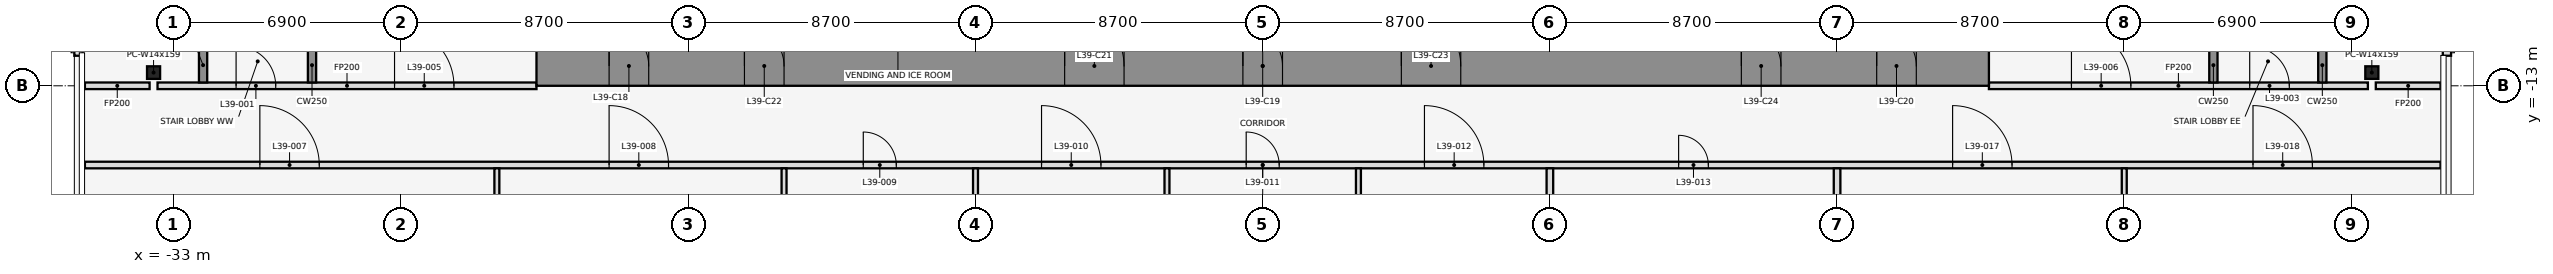
"""IFC4 building model, lengths in metres.
Left out: names, types, materials, properties, quantities, classifications, styles, units other than length and angle.
Written with IfcOpenShell. Run it as: python <this file> out.ifc"""

import sys

from ifc_helpers import new_model, si_unit, direction, frame, frame_2d, origin, origin_2d, place, context, subcontext, project, spatial, rectangle, i_section, extrude, element, fill, save


model = new_model("IFC4")
c1 = context("Model", 3, precision=1e-05, world=origin(), true_north=direction((0.0, 1.0)))
c2 = subcontext(c1, "Body", "Model", "MODEL_VIEW")
j1 = project(units=[si_unit("LENGTHUNIT", "METRE"), si_unit("PLANEANGLEUNIT", "RADIAN")], contexts=[c1])
p1 = place(None, origin())
s1 = spatial("IfcSite", under=j1, at=p1, CompositionType="ELEMENT")
p2 = place(p1, origin())
s2 = spatial("IfcBuilding", under=s1, at=p2, CompositionType="ELEMENT")
p3 = place(p2, frame((0.0, 0.0, 177.3)))
s3 = spatial("IfcBuildingStorey", under=s2, at=p3, CompositionType="ELEMENT", Elevation=177.3)
for number, where, z_axis, x_axis in (
    (1, (-33.6, -12.6, 0.0), (0.0, 0.0, 1.0), (1.0, 0.0, 0.0)),
    (2, (33.6, -12.6, 0.0), (0.0, 0.0, 1.0), (1.0, 0.0, 0.0)),
):
    element("IfcColumn", number, at=place(p3, frame(where, z_axis=z_axis, x_axis=x_axis)), inside=s3, PredefinedType="COLUMN", context=c2, shape_type="SweptSolid", body=[
        extrude(i_section(OverallWidth=0.396, OverallDepth=0.381, WebThickness=0.019, FlangeThickness=0.03, at=origin_2d()), origin(), (0.0, 0.0, 1.0), 4.1),
    ])
for number, where, z_axis, x_axis in (
    (3, (-35.875, -3.0, 0.0), (0.0, 0.0, 1.0), (0.0, -1.0, 0.0)),
    (4, (35.875, -12.09, 0.0), (0.0, 0.0, 1.0), (0.0, 1.0, 0.0)),
):
    element("IfcWall", number, at=place(p3, frame(where, z_axis=z_axis, x_axis=x_axis)), inside=s3, PredefinedType="STANDARD", context=c2, shape_type="SweptSolid", body=[
        extrude(rectangle(XDim=9.09, YDim=0.25, at=frame_2d((4.545, 0.0))), origin(), (0.0, 0.0, 1.0), 3.95),
    ])
p4 = place(p3, frame((-35.68, -15.4, 0.0), z_axis=(0.0, 0.0, 1.0), x_axis=(1.0, 0.0, 0.0)))
e5 = element("IfcWall", 5, at=p4, inside=s3, PredefinedType="PARTITIONING", context=c2, shape_type="SweptSolid", body=[
    extrude(rectangle(XDim=71.36, YDim=0.2, at=frame_2d((35.68, 0.0))), origin(), (0.0, 0.0, 1.0), 2.84),
])
p5 = place(p4, frame((5.3, 0.0, 0.0)))
e6 = element("IfcOpeningElement", 6, at=p5, cuts=e5, PredefinedType="OPENING", context=c2, shape_type="SweptSolid", body=[
    extrude(rectangle(XDim=1.8, YDim=2.1, at=frame_2d((0.9, 1.05))), frame((0.0, 0.112, 0.0), z_axis=(0.0, -1.0, 0.0), x_axis=(1.0, 0.0, 0.0)), (0.0, 0.0, 1.0), 0.224),
])
p6 = place(p4, frame((15.88, 0.0, 0.0)))
e7 = element("IfcOpeningElement", 7, at=p6, cuts=e5, PredefinedType="OPENING", context=c2, shape_type="SweptSolid", body=[
    extrude(rectangle(XDim=1.8, YDim=2.1, at=frame_2d((0.9, 1.05))), frame((0.0, 0.112, 0.0), z_axis=(0.0, -1.0, 0.0), x_axis=(1.0, 0.0, 0.0)), (0.0, 0.0, 1.0), 0.224),
])
p7 = place(p4, frame((23.58, 0.0, 0.0)))
e8 = element("IfcOpeningElement", 8, at=p7, cuts=e5, PredefinedType="OPENING", context=c2, shape_type="SweptSolid", body=[
    extrude(rectangle(XDim=1.0, YDim=2.1, at=frame_2d((0.5, 1.05))), frame((0.0, 0.112, 0.0), z_axis=(0.0, -1.0, 0.0), x_axis=(1.0, 0.0, 0.0)), (0.0, 0.0, 1.0), 0.224),
])
p8 = place(p4, frame((28.98, 0.0, 0.0)))
e9 = element("IfcOpeningElement", 9, at=p8, cuts=e5, PredefinedType="OPENING", context=c2, shape_type="SweptSolid", body=[
    extrude(rectangle(XDim=1.8, YDim=2.1, at=frame_2d((0.9, 1.05))), frame((0.0, 0.112, 0.0), z_axis=(0.0, -1.0, 0.0), x_axis=(1.0, 0.0, 0.0)), (0.0, 0.0, 1.0), 0.224),
])
p9 = place(p4, frame((35.18, 0.0, 0.0)))
e10 = element("IfcOpeningElement", 10, at=p9, cuts=e5, PredefinedType="OPENING", context=c2, shape_type="SweptSolid", body=[
    extrude(rectangle(XDim=1.0, YDim=2.1, at=frame_2d((0.5, 1.05))), frame((0.0, 0.112, 0.0), z_axis=(0.0, -1.0, 0.0), x_axis=(1.0, 0.0, 0.0)), (0.0, 0.0, 1.0), 0.224),
])
p10 = place(p4, frame((40.58, 0.0, 0.0)))
e11 = element("IfcOpeningElement", 11, at=p10, cuts=e5, PredefinedType="OPENING", context=c2, shape_type="SweptSolid", body=[
    extrude(rectangle(XDim=1.8, YDim=2.1, at=frame_2d((0.9, 1.05))), frame((0.0, 0.112, 0.0), z_axis=(0.0, -1.0, 0.0), x_axis=(1.0, 0.0, 0.0)), (0.0, 0.0, 1.0), 0.224),
])
p11 = place(p4, frame((48.28, 0.0, 0.0)))
e12 = element("IfcOpeningElement", 12, at=p11, cuts=e5, PredefinedType="OPENING", context=c2, shape_type="SweptSolid", body=[
    extrude(rectangle(XDim=0.9, YDim=2.1, at=frame_2d((0.45, 1.05))), frame((0.0, 0.112, 0.0), z_axis=(0.0, -1.0, 0.0), x_axis=(1.0, 0.0, 0.0)), (0.0, 0.0, 1.0), 0.224),
])
p12 = place(p4, frame((56.58, 0.0, 0.0)))
e13 = element("IfcOpeningElement", 13, at=p12, cuts=e5, PredefinedType="OPENING", context=c2, shape_type="SweptSolid", body=[
    extrude(rectangle(XDim=1.8, YDim=2.1, at=frame_2d((0.9, 1.05))), frame((0.0, 0.112, 0.0), z_axis=(0.0, -1.0, 0.0), x_axis=(1.0, 0.0, 0.0)), (0.0, 0.0, 1.0), 0.224),
])
p13 = place(p4, frame((65.68, 0.0, 0.0)))
e14 = element("IfcOpeningElement", 14, at=p13, cuts=e5, PredefinedType="OPENING", context=c2, shape_type="SweptSolid", body=[
    extrude(rectangle(XDim=1.8, YDim=2.1, at=frame_2d((0.9, 1.05))), frame((0.0, 0.112, 0.0), z_axis=(0.0, -1.0, 0.0), x_axis=(1.0, 0.0, 0.0)), (0.0, 0.0, 1.0), 0.224),
])
p14 = place(p3, frame((-35.68, -13.0, 0.0), z_axis=(0.0, 0.0, 1.0), x_axis=(1.0, 0.0, 0.0)))
e15 = element("IfcWall", 15, at=p14, inside=s3, PredefinedType="PARTITIONING", context=c2, shape_type="SweptSolid", body=[
    extrude(rectangle(XDim=1.96, YDim=0.2, at=frame_2d((0.98, 0.0))), origin(), (0.0, 0.0, 1.0), 2.84),
])
p15 = place(p3, frame((-33.48, -13.0, 0.0), z_axis=(0.0, 0.0, 1.0), x_axis=(1.0, 0.0, 0.0)))
e16 = element("IfcWall", 16, at=p15, inside=s3, PredefinedType="PARTITIONING", context=c2, shape_type="SweptSolid", body=[
    extrude(rectangle(XDim=11.48, YDim=0.2, at=frame_2d((5.74, 0.0))), origin(), (0.0, 0.0, 1.0), 2.84),
])
p16 = place(p15, frame((2.38, 0.0, 0.0)))
e17 = element("IfcOpeningElement", 17, at=p16, cuts=e16, PredefinedType="OPENING", context=c2, shape_type="SweptSolid", body=[
    extrude(rectangle(XDim=1.2, YDim=2.1, at=frame_2d((0.6, 1.05))), frame((0.0, 0.112, 0.0), z_axis=(0.0, -1.0, 0.0), x_axis=(1.0, 0.0, 0.0)), (0.0, 0.0, 1.0), 0.224),
])
p17 = place(p15, frame((7.18, 0.0, 0.0)))
e18 = element("IfcOpeningElement", 18, at=p17, cuts=e16, PredefinedType="OPENING", context=c2, shape_type="SweptSolid", body=[
    extrude(rectangle(XDim=1.8, YDim=2.1, at=frame_2d((0.9, 1.05))), frame((0.0, 0.112, 0.0), z_axis=(0.0, -1.0, 0.0), x_axis=(1.0, 0.0, 0.0)), (0.0, 0.0, 1.0), 0.224),
])
p18 = place(p3, frame((22.0, -13.0, 0.0), z_axis=(0.0, 0.0, 1.0), x_axis=(1.0, 0.0, 0.0)))
e19 = element("IfcWall", 19, at=p18, inside=s3, PredefinedType="PARTITIONING", context=c2, shape_type="SweptSolid", body=[
    extrude(rectangle(XDim=11.48, YDim=0.2, at=frame_2d((5.74, 0.0))), origin(), (0.0, 0.0, 1.0), 2.84),
])
p19 = place(p18, frame((7.9, 0.0, 0.0)))
e20 = element("IfcOpeningElement", 20, at=p19, cuts=e19, PredefinedType="OPENING", context=c2, shape_type="SweptSolid", body=[
    extrude(rectangle(XDim=1.2, YDim=2.1, at=frame_2d((0.6, 1.05))), frame((0.0, 0.112, 0.0), z_axis=(0.0, -1.0, 0.0), x_axis=(1.0, 0.0, 0.0)), (0.0, 0.0, 1.0), 0.224),
])
p20 = place(p18, frame((2.5, 0.0, 0.0)))
e21 = element("IfcOpeningElement", 21, at=p20, cuts=e19, PredefinedType="OPENING", context=c2, shape_type="SweptSolid", body=[
    extrude(rectangle(XDim=1.8, YDim=2.1, at=frame_2d((0.9, 1.05))), frame((0.0, 0.112, 0.0), z_axis=(0.0, -1.0, 0.0), x_axis=(1.0, 0.0, 0.0)), (0.0, 0.0, 1.0), 0.224),
])
p21 = place(p3, frame((33.72, -13.0, 0.0), z_axis=(0.0, 0.0, 1.0), x_axis=(1.0, 0.0, 0.0)))
e22 = element("IfcWall", 22, at=p21, inside=s3, PredefinedType="PARTITIONING", context=c2, shape_type="SweptSolid", body=[
    extrude(rectangle(XDim=1.96, YDim=0.2, at=frame_2d((0.98, 0.0))), origin(), (0.0, 0.0, 1.0), 2.84),
])
for number, where, z_axis, x_axis in (
    (23, (-32.1, -12.9, 0.0), (0.0, 0.0, 1.0), (0.0, 1.0, 0.0)),
    (24, (-28.8, -12.9, 0.0), (0.0, 0.0, 1.0), (0.0, 1.0, 0.0)),
):
    element("IfcWall", number, at=place(p3, frame(where, z_axis=z_axis, x_axis=x_axis)), inside=s3, PredefinedType="SHEAR", context=c2, shape_type="SweptSolid", body=[
        extrude(rectangle(XDim=1.05, YDim=0.25, at=frame_2d((0.525, 0.0))), origin(), (0.0, 0.0, 1.0), 4.1),
    ])
p22 = place(p3, frame((-23.2, -33.74, 0.0), z_axis=(0.0, 0.0, 1.0), x_axis=(0.0, 1.0, 0.0)))
e25 = element("IfcWall", 25, at=p22, inside=s3, PredefinedType="PARTITIONING", context=c2, shape_type="SweptSolid", body=[
    extrude(rectangle(XDim=18.24, YDim=0.15, at=frame_2d((9.12, 0.0))), origin(), (0.0, 0.0, 1.0), 2.84),
])
p23 = place(p3, frame((-14.5, -32.145, 0.0), z_axis=(0.0, 0.0, 1.0), x_axis=(0.0, 1.0, 0.0)))
e26 = element("IfcWall", 26, at=p23, inside=s3, PredefinedType="PARTITIONING", context=c2, shape_type="SweptSolid", body=[
    extrude(rectangle(XDim=16.645, YDim=0.15, at=frame_2d((8.323, 0.0))), origin(), (0.0, 0.0, 1.0), 2.84),
])
p24 = place(p3, frame((-8.7, -34.295, 0.0), z_axis=(0.0, 0.0, 1.0), x_axis=(0.0, 1.0, 0.0)))
e27 = element("IfcWall", 27, at=p24, inside=s3, PredefinedType="PARTITIONING", context=c2, shape_type="SweptSolid", body=[
    extrude(rectangle(XDim=18.795, YDim=0.15, at=frame_2d((9.397, 0.0))), origin(), (0.0, 0.0, 1.0), 2.84),
])
for number, where, z_axis, x_axis in (
    (28, (-2.9, -35.42, 0.0), (0.0, 0.0, 1.0), (0.0, 1.0, 0.0)),
    (29, (2.9, -35.42, 0.0), (0.0, 0.0, 1.0), (0.0, 1.0, 0.0)),
):
    element("IfcWall", number, at=place(p3, frame(where, z_axis=z_axis, x_axis=x_axis)), inside=s3, PredefinedType="PARTITIONING", context=c2, shape_type="SweptSolid", body=[
        extrude(rectangle(XDim=19.92, YDim=0.15, at=frame_2d((9.96, 0.0))), origin(), (0.0, 0.0, 1.0), 2.84),
    ])
p25 = place(p3, frame((8.7, -34.295, 0.0), z_axis=(0.0, 0.0, 1.0), x_axis=(0.0, 1.0, 0.0)))
e30 = element("IfcWall", 30, at=p25, inside=s3, PredefinedType="PARTITIONING", context=c2, shape_type="SweptSolid", body=[
    extrude(rectangle(XDim=18.795, YDim=0.2, at=frame_2d((9.397, 0.0))), origin(), (0.0, 0.0, 1.0), 2.84),
])
p26 = place(p3, frame((17.4, -21.725, 0.0), z_axis=(0.0, 0.0, 1.0), x_axis=(0.0, 1.0, 0.0)))
e31 = element("IfcWall", 31, at=p26, inside=s3, PredefinedType="PARTITIONING", context=c2, shape_type="SweptSolid", body=[
    extrude(rectangle(XDim=6.225, YDim=0.2, at=frame_2d((3.113, 0.0))), origin(), (0.0, 0.0, 1.0), 2.84),
])
p27 = place(p3, frame((26.1, -33.74, 0.0), z_axis=(0.0, 0.0, 1.0), x_axis=(0.0, 1.0, 0.0)))
e32 = element("IfcWall", 32, at=p27, inside=s3, PredefinedType="PARTITIONING", context=c2, shape_type="SweptSolid", body=[
    extrude(rectangle(XDim=18.24, YDim=0.15, at=frame_2d((9.12, 0.0))), origin(), (0.0, 0.0, 1.0), 2.84),
])
for number, where, z_axis, x_axis in (
    (33, (28.8, -12.9, 0.0), (0.0, 0.0, 1.0), (0.0, 1.0, 0.0)),
    (34, (32.1, -12.9, 0.0), (0.0, 0.0, 1.0), (0.0, 1.0, 0.0)),
):
    element("IfcWall", number, at=place(p3, frame(where, z_axis=z_axis, x_axis=x_axis)), inside=s3, PredefinedType="SHEAR", context=c2, shape_type="SweptSolid", body=[
        extrude(rectangle(XDim=1.05, YDim=0.25, at=frame_2d((0.525, 0.0))), origin(), (0.0, 0.0, 1.0), 4.1),
    ])
p28 = place(p3, frame((-22.0, -12.4, 0.0), z_axis=(0.0, 0.0, 1.0), x_axis=(1.0, 0.0, 0.0)))
e35 = element("IfcWall", 35, at=p28, inside=s3, PredefinedType="SHEAR", context=c2, shape_type="SweptSolid", body=[
    extrude(rectangle(XDim=44.0, YDim=1.2, at=frame_2d((22.0, 0.0))), origin(), (0.0, 0.0, 1.0), 4.1),
])
p29 = place(p28, frame((2.2, 0.0, 0.0)))
e36 = element("IfcOpeningElement", 36, at=p29, cuts=e35, PredefinedType="OPENING", context=c2, shape_type="SweptSolid", body=[
    extrude(rectangle(XDim=1.2, YDim=2.1, at=frame_2d((0.6, 1.05))), frame((0.0, 0.612, 0.0), z_axis=(0.0, -1.0, 0.0), x_axis=(1.0, 0.0, 0.0)), (0.0, 0.0, 1.0), 1.224),
])
p30 = place(p28, frame((21.4, 0.0, 0.0)))
e37 = element("IfcOpeningElement", 37, at=p30, cuts=e35, PredefinedType="OPENING", context=c2, shape_type="SweptSolid", body=[
    extrude(rectangle(XDim=1.2, YDim=2.1, at=frame_2d((0.6, 1.05))), frame((0.0, 0.612, 0.0), z_axis=(0.0, -1.0, 0.0), x_axis=(1.0, 0.0, 0.0)), (0.0, 0.0, 1.0), 1.224),
])
p31 = place(p28, frame((40.6, 0.0, 0.0)))
e38 = element("IfcOpeningElement", 38, at=p31, cuts=e35, PredefinedType="OPENING", context=c2, shape_type="SweptSolid", body=[
    extrude(rectangle(XDim=1.2, YDim=2.1, at=frame_2d((0.6, 1.05))), frame((0.0, 0.612, 0.0), z_axis=(0.0, -1.0, 0.0), x_axis=(1.0, 0.0, 0.0)), (0.0, 0.0, 1.0), 1.224),
])
p32 = place(p28, frame((16.0, 0.0, 0.0)))
e39 = element("IfcOpeningElement", 39, at=p32, cuts=e35, PredefinedType="OPENING", context=c2, shape_type="SweptSolid", body=[
    extrude(rectangle(XDim=1.8, YDim=2.1, at=frame_2d((0.9, 1.05))), frame((0.0, 0.612, 0.0), z_axis=(0.0, -1.0, 0.0), x_axis=(1.0, 0.0, 0.0)), (0.0, 0.0, 1.0), 1.224),
])
p33 = place(p28, frame((6.3, 0.0, 0.0)))
e40 = element("IfcOpeningElement", 40, at=p33, cuts=e35, PredefinedType="OPENING", context=c2, shape_type="SweptSolid", body=[
    extrude(rectangle(XDim=1.2, YDim=2.1, at=frame_2d((0.6, 1.05))), frame((0.0, 0.612, 0.0), z_axis=(0.0, -1.0, 0.0), x_axis=(1.0, 0.0, 0.0)), (0.0, 0.0, 1.0), 1.224),
])
p34 = place(p28, frame((26.2, 0.0, 0.0)))
e41 = element("IfcOpeningElement", 41, at=p34, cuts=e35, PredefinedType="OPENING", context=c2, shape_type="SweptSolid", body=[
    extrude(rectangle(XDim=1.8, YDim=2.1, at=frame_2d((0.9, 1.05))), frame((0.0, 0.612, 0.0), z_axis=(0.0, -1.0, 0.0), x_axis=(1.0, 0.0, 0.0)), (0.0, 0.0, 1.0), 1.224),
])
p35 = place(p28, frame((36.5, 0.0, 0.0)))
e42 = element("IfcOpeningElement", 42, at=p35, cuts=e35, PredefinedType="OPENING", context=c2, shape_type="SweptSolid", body=[
    extrude(rectangle(XDim=1.2, YDim=2.1, at=frame_2d((0.6, 1.05))), frame((0.0, 0.612, 0.0), z_axis=(0.0, -1.0, 0.0), x_axis=(1.0, 0.0, 0.0)), (0.0, 0.0, 1.0), 1.224),
])
p36 = place(p16, origin())
e43 = element("IfcDoor", 43, at=p36, inside=s3, OperationType="SINGLE_SWING_LEFT", PredefinedType="DOOR", context=c2, shape_type="SweptSolid", body=[
    extrude(rectangle(XDim=1.2, YDim=2.1, at=frame_2d((0.6, 1.05))), frame((0.0, 0.025, 0.0), z_axis=(0.0, -1.0, 0.0), x_axis=(1.0, 0.0, 0.0)), (0.0, 0.0, 1.0), 0.05),
])
fill(e17, e43)
p37 = place(p19, origin())
e44 = element("IfcDoor", 44, at=p37, inside=s3, OperationType="SINGLE_SWING_RIGHT", PredefinedType="DOOR", context=c2, shape_type="SweptSolid", body=[
    extrude(rectangle(XDim=1.2, YDim=2.1, at=frame_2d((0.6, 1.05))), frame((0.0, 0.025, 0.0), z_axis=(0.0, -1.0, 0.0), x_axis=(1.0, 0.0, 0.0)), (0.0, 0.0, 1.0), 0.05),
])
fill(e20, e44)
p38 = place(p17, origin())
e45 = element("IfcDoor", 45, at=p38, inside=s3, OperationType="SINGLE_SWING_LEFT", PredefinedType="DOOR", context=c2, shape_type="SweptSolid", body=[
    extrude(rectangle(XDim=1.8, YDim=2.1, at=frame_2d((0.9, 1.05))), frame((0.0, 0.025, 0.0), z_axis=(0.0, -1.0, 0.0), x_axis=(1.0, 0.0, 0.0)), (0.0, 0.0, 1.0), 0.05),
])
fill(e18, e45)
p39 = place(p20, origin())
e46 = element("IfcDoor", 46, at=p39, inside=s3, OperationType="SINGLE_SWING_LEFT", PredefinedType="DOOR", context=c2, shape_type="SweptSolid", body=[
    extrude(rectangle(XDim=1.8, YDim=2.1, at=frame_2d((0.9, 1.05))), frame((0.0, 0.025, 0.0), z_axis=(0.0, -1.0, 0.0), x_axis=(1.0, 0.0, 0.0)), (0.0, 0.0, 1.0), 0.05),
])
fill(e21, e46)
p40 = place(p5, origin())
e47 = element("IfcDoor", 47, at=p40, inside=s3, OperationType="SINGLE_SWING_LEFT", PredefinedType="DOOR", context=c2, shape_type="SweptSolid", body=[
    extrude(rectangle(XDim=1.8, YDim=2.1, at=frame_2d((0.9, 1.05))), frame((0.0, 0.025, 0.0), z_axis=(0.0, -1.0, 0.0), x_axis=(1.0, 0.0, 0.0)), (0.0, 0.0, 1.0), 0.05),
])
fill(e6, e47)
p41 = place(p6, origin())
e48 = element("IfcDoor", 48, at=p41, inside=s3, OperationType="SINGLE_SWING_LEFT", PredefinedType="DOOR", context=c2, shape_type="SweptSolid", body=[
    extrude(rectangle(XDim=1.8, YDim=2.1, at=frame_2d((0.9, 1.05))), frame((0.0, 0.025, 0.0), z_axis=(0.0, -1.0, 0.0), x_axis=(1.0, 0.0, 0.0)), (0.0, 0.0, 1.0), 0.05),
])
fill(e7, e48)
p42 = place(p7, frame((1.0, 0.0, 0.0), z_axis=(0.0, 0.0, 1.0), x_axis=(-1.0, 0.0, 0.0)))
e49 = element("IfcDoor", 49, at=p42, inside=s3, OperationType="SINGLE_SWING_RIGHT", PredefinedType="DOOR", context=c2, shape_type="SweptSolid", body=[
    extrude(rectangle(XDim=1.0, YDim=2.1, at=frame_2d((0.5, 1.05))), frame((0.0, 0.025, 0.0), z_axis=(0.0, -1.0, 0.0), x_axis=(1.0, 0.0, 0.0)), (0.0, 0.0, 1.0), 0.05),
])
fill(e8, e49)
p43 = place(p8, origin())
e50 = element("IfcDoor", 50, at=p43, inside=s3, OperationType="SINGLE_SWING_LEFT", PredefinedType="DOOR", context=c2, shape_type="SweptSolid", body=[
    extrude(rectangle(XDim=1.8, YDim=2.1, at=frame_2d((0.9, 1.05))), frame((0.0, 0.025, 0.0), z_axis=(0.0, -1.0, 0.0), x_axis=(1.0, 0.0, 0.0)), (0.0, 0.0, 1.0), 0.05),
])
fill(e9, e50)
p44 = place(p9, frame((1.0, 0.0, 0.0), z_axis=(0.0, 0.0, 1.0), x_axis=(-1.0, 0.0, 0.0)))
e51 = element("IfcDoor", 51, at=p44, inside=s3, OperationType="SINGLE_SWING_RIGHT", PredefinedType="DOOR", context=c2, shape_type="SweptSolid", body=[
    extrude(rectangle(XDim=1.0, YDim=2.1, at=frame_2d((0.5, 1.05))), frame((0.0, 0.025, 0.0), z_axis=(0.0, -1.0, 0.0), x_axis=(1.0, 0.0, 0.0)), (0.0, 0.0, 1.0), 0.05),
])
fill(e10, e51)
p45 = place(p10, origin())
e52 = element("IfcDoor", 52, at=p45, inside=s3, OperationType="SINGLE_SWING_LEFT", PredefinedType="DOOR", context=c2, shape_type="SweptSolid", body=[
    extrude(rectangle(XDim=1.8, YDim=2.1, at=frame_2d((0.9, 1.05))), frame((0.0, 0.025, 0.0), z_axis=(0.0, -1.0, 0.0), x_axis=(1.0, 0.0, 0.0)), (0.0, 0.0, 1.0), 0.05),
])
fill(e11, e52)
p46 = place(p11, frame((0.9, 0.0, 0.0), z_axis=(0.0, 0.0, 1.0), x_axis=(-1.0, 0.0, 0.0)))
e53 = element("IfcDoor", 53, at=p46, inside=s3, OperationType="SINGLE_SWING_LEFT", PredefinedType="DOOR", context=c2, shape_type="SweptSolid", body=[
    extrude(rectangle(XDim=0.9, YDim=2.1, at=frame_2d((0.45, 1.05))), frame((0.0, 0.025, 0.0), z_axis=(0.0, -1.0, 0.0), x_axis=(1.0, 0.0, 0.0)), (0.0, 0.0, 1.0), 0.05),
])
fill(e12, e53)
p47 = place(p12, origin())
e54 = element("IfcDoor", 54, at=p47, inside=s3, OperationType="SINGLE_SWING_LEFT", PredefinedType="DOOR", context=c2, shape_type="SweptSolid", body=[
    extrude(rectangle(XDim=1.8, YDim=2.1, at=frame_2d((0.9, 1.05))), frame((0.0, 0.025, 0.0), z_axis=(0.0, -1.0, 0.0), x_axis=(1.0, 0.0, 0.0)), (0.0, 0.0, 1.0), 0.05),
])
fill(e13, e54)
p48 = place(p13, origin())
e55 = element("IfcDoor", 55, at=p48, inside=s3, OperationType="SINGLE_SWING_LEFT", PredefinedType="DOOR", context=c2, shape_type="SweptSolid", body=[
    extrude(rectangle(XDim=1.8, YDim=2.1, at=frame_2d((0.9, 1.05))), frame((0.0, 0.025, 0.0), z_axis=(0.0, -1.0, 0.0), x_axis=(1.0, 0.0, 0.0)), (0.0, 0.0, 1.0), 0.05),
])
fill(e14, e55)
p49 = place(p29, frame((1.2, 0.0, 0.0), z_axis=(0.0, 0.0, 1.0), x_axis=(-1.0, 0.0, 0.0)))
e56 = element("IfcDoor", 56, at=p49, inside=s3, OperationType="SINGLE_SWING_RIGHT", PredefinedType="DOOR", context=c2, shape_type="SweptSolid", body=[
    extrude(rectangle(XDim=1.2, YDim=2.1, at=frame_2d((0.6, 1.05))), frame((0.0, 0.025, 0.0), z_axis=(0.0, -1.0, 0.0), x_axis=(1.0, 0.0, 0.0)), (0.0, 0.0, 1.0), 0.05),
])
fill(e36, e56)
p50 = place(p30, frame((1.2, 0.0, 0.0), z_axis=(0.0, 0.0, 1.0), x_axis=(-1.0, 0.0, 0.0)))
e57 = element("IfcDoor", 57, at=p50, inside=s3, OperationType="SINGLE_SWING_RIGHT", PredefinedType="DOOR", context=c2, shape_type="SweptSolid", body=[
    extrude(rectangle(XDim=1.2, YDim=2.1, at=frame_2d((0.6, 1.05))), frame((0.0, 0.025, 0.0), z_axis=(0.0, -1.0, 0.0), x_axis=(1.0, 0.0, 0.0)), (0.0, 0.0, 1.0), 0.05),
])
fill(e37, e57)
p51 = place(p31, frame((1.2, 0.0, 0.0), z_axis=(0.0, 0.0, 1.0), x_axis=(-1.0, 0.0, 0.0)))
e58 = element("IfcDoor", 58, at=p51, inside=s3, OperationType="SINGLE_SWING_RIGHT", PredefinedType="DOOR", context=c2, shape_type="SweptSolid", body=[
    extrude(rectangle(XDim=1.2, YDim=2.1, at=frame_2d((0.6, 1.05))), frame((0.0, 0.025, 0.0), z_axis=(0.0, -1.0, 0.0), x_axis=(1.0, 0.0, 0.0)), (0.0, 0.0, 1.0), 0.05),
])
fill(e38, e58)
p52 = place(p32, origin())
e59 = element("IfcDoor", 59, at=p52, inside=s3, OperationType="SINGLE_SWING_LEFT", PredefinedType="DOOR", context=c2, shape_type="SweptSolid", body=[
    extrude(rectangle(XDim=1.8, YDim=2.1, at=frame_2d((0.9, 1.05))), frame((0.0, 0.025, 0.0), z_axis=(0.0, -1.0, 0.0), x_axis=(1.0, 0.0, 0.0)), (0.0, 0.0, 1.0), 0.05),
])
fill(e39, e59)
p53 = place(p33, frame((1.2, 0.0, 0.0), z_axis=(0.0, 0.0, 1.0), x_axis=(-1.0, 0.0, 0.0)))
e60 = element("IfcDoor", 60, at=p53, inside=s3, OperationType="SINGLE_SWING_RIGHT", PredefinedType="DOOR", context=c2, shape_type="SweptSolid", body=[
    extrude(rectangle(XDim=1.2, YDim=2.1, at=frame_2d((0.6, 1.05))), frame((0.0, 0.025, 0.0), z_axis=(0.0, -1.0, 0.0), x_axis=(1.0, 0.0, 0.0)), (0.0, 0.0, 1.0), 0.05),
])
fill(e40, e60)
p54 = place(p34, origin())
e61 = element("IfcDoor", 61, at=p54, inside=s3, OperationType="SINGLE_SWING_LEFT", PredefinedType="DOOR", context=c2, shape_type="SweptSolid", body=[
    extrude(rectangle(XDim=1.8, YDim=2.1, at=frame_2d((0.9, 1.05))), frame((0.0, 0.025, 0.0), z_axis=(0.0, -1.0, 0.0), x_axis=(1.0, 0.0, 0.0)), (0.0, 0.0, 1.0), 0.05),
])
fill(e41, e61)
p55 = place(p35, frame((1.2, 0.0, 0.0), z_axis=(0.0, 0.0, 1.0), x_axis=(-1.0, 0.0, 0.0)))
e62 = element("IfcDoor", 62, at=p55, inside=s3, OperationType="SINGLE_SWING_RIGHT", PredefinedType="DOOR", context=c2, shape_type="SweptSolid", body=[
    extrude(rectangle(XDim=1.2, YDim=2.1, at=frame_2d((0.6, 1.05))), frame((0.0, 0.025, 0.0), z_axis=(0.0, -1.0, 0.0), x_axis=(1.0, 0.0, 0.0)), (0.0, 0.0, 1.0), 0.05),
])
fill(e42, e62)
save(model, sys.argv[1])
